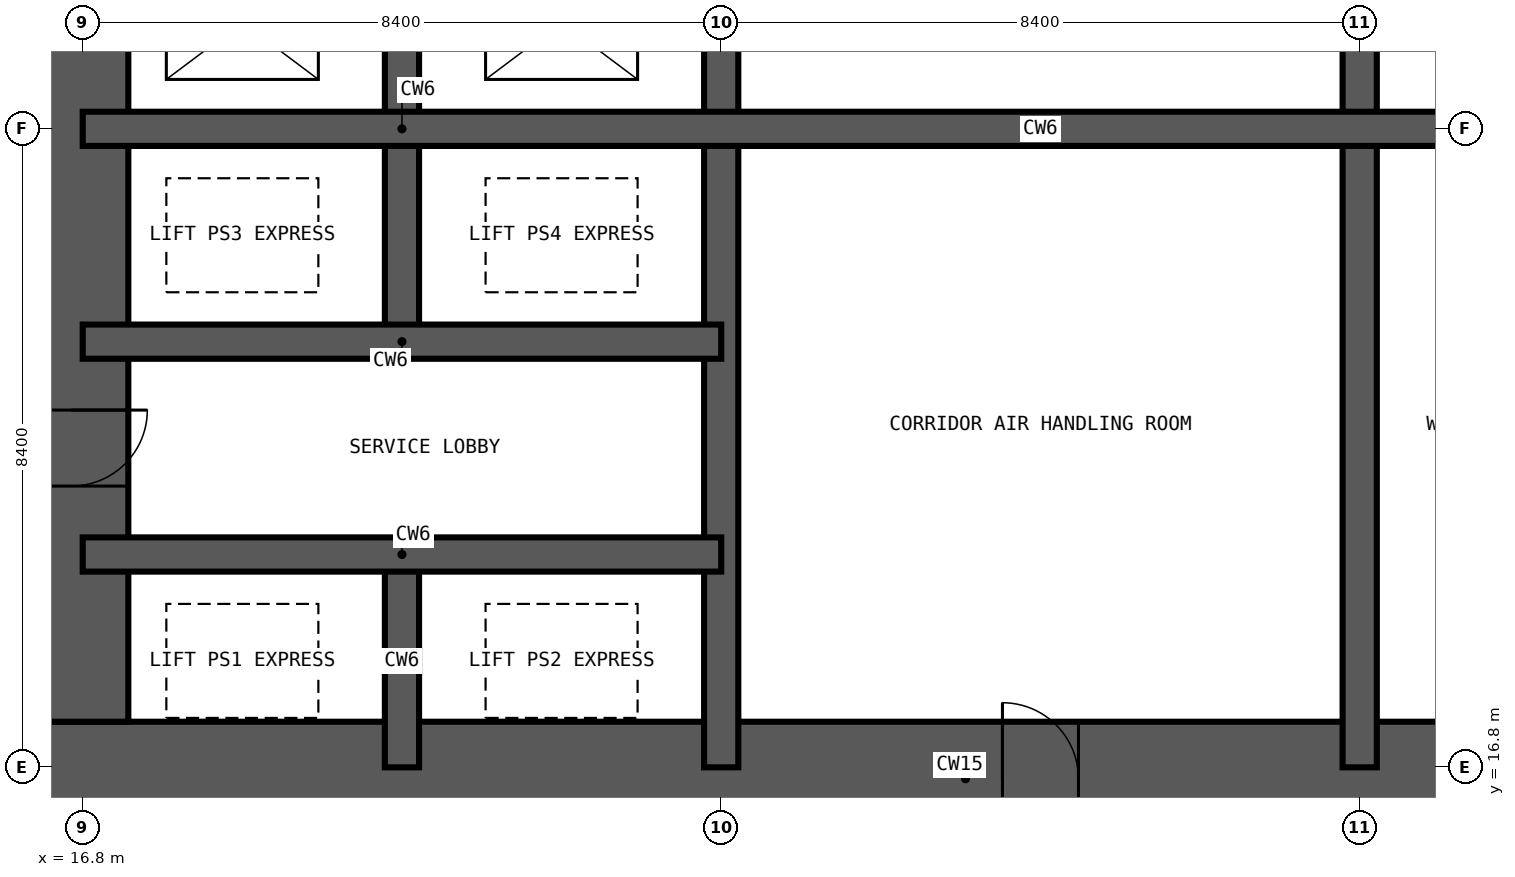
"""IFC4 building model, lengths in metres.
Left out: names, types, materials, properties, quantities, classifications, styles, units other than length and angle.
Written with IfcOpenShell. Run it as: python <this file> out.ifc"""

import sys

from ifc_helpers import new_model, si_unit, direction, frame, frame_2d, origin, place, context, subcontext, project, spatial, rectangle, extrude, element, fill, save


model = new_model("IFC4")
c1 = context("Model", 3, precision=1e-05, world=origin(), true_north=direction((0.0, 1.0)))
c2 = subcontext(c1, "Body", "Model", "MODEL_VIEW")
j1 = project(units=[si_unit("LENGTHUNIT", "METRE"), si_unit("PLANEANGLEUNIT", "RADIAN")], contexts=[c1])
p1 = place(None, origin())
s1 = spatial("IfcSite", under=j1, at=p1, CompositionType="ELEMENT")
p2 = place(p1, origin())
s2 = spatial("IfcBuilding", under=s1, at=p2, CompositionType="ELEMENT")
p3 = place(p2, frame((0.0, 0.0, 84.6)))
s3 = spatial("IfcBuildingStorey", under=s2, at=p3, CompositionType="ELEMENT", Elevation=84.6)
p4 = place(p3, frame((15.9, 16.65, -0.35), z_axis=(0.0, 0.0, 1.0), x_axis=(1.0, 0.0, 0.0)))
e1 = element("IfcWall", 1, at=p4, inside=s3, PredefinedType="SHEAR", context=c2, shape_type="SweptSolid", body=[
    extrude(rectangle(XDim=27.0, YDim=1.5, at=frame_2d((13.5, 0.0))), origin(), (0.0, 0.0, 1.0), 3.55),
])
p5 = place(p4, frame((13.0, 0.0, 0.35)))
e2 = element("IfcOpeningElement", 2, at=p5, cuts=e1, PredefinedType="OPENING", context=c2, shape_type="SweptSolid", body=[
    extrude(rectangle(XDim=1.0, YDim=2.1, at=frame_2d((0.5, 1.05))), frame((0.0, 0.76, 0.0), z_axis=(0.0, -1.0, 0.0), x_axis=(1.0, 0.0, 0.0)), (0.0, 0.0, 1.0), 1.52),
])
p6 = place(p4, frame((19.3, 0.0, 0.35)))
e3 = element("IfcOpeningElement", 3, at=p6, cuts=e1, PredefinedType="OPENING", context=c2, shape_type="SweptSolid", body=[
    extrude(rectangle(XDim=1.0, YDim=2.1, at=frame_2d((0.5, 1.05))), frame((0.0, 0.76, 0.0), z_axis=(0.0, -1.0, 0.0), x_axis=(1.0, 0.0, 0.0)), (0.0, 0.0, 1.0), 1.52),
])
p7 = place(p3, frame((16.65, 41.4, -0.35), z_axis=(0.0, 0.0, 1.0), x_axis=(0.0, -1.0, 0.0)))
e4 = element("IfcWall", 4, at=p7, inside=s3, PredefinedType="SHEAR", context=c2, shape_type="SweptSolid", body=[
    extrude(rectangle(XDim=24.0, YDim=1.5, at=frame_2d((12.0, 0.0))), origin(), (0.0, 0.0, 1.0), 3.55),
])
p8 = place(p7, frame((11.1, 0.0, 0.35)))
e5 = element("IfcOpeningElement", 5, at=p8, cuts=e4, PredefinedType="OPENING", context=c2, shape_type="SweptSolid", body=[
    extrude(rectangle(XDim=1.8, YDim=2.2, at=frame_2d((0.9, 1.1))), frame((0.0, 0.76, 0.0), z_axis=(0.0, -1.0, 0.0), x_axis=(1.0, 0.0, 0.0)), (0.0, 0.0, 1.0), 1.52),
])
p9 = place(p7, frame((19.9, 0.0, 0.35)))
e6 = element("IfcOpeningElement", 6, at=p9, cuts=e4, PredefinedType="OPENING", context=c2, shape_type="SweptSolid", body=[
    extrude(rectangle(XDim=1.0, YDim=2.1, at=frame_2d((0.5, 1.05))), frame((0.0, 0.76, 0.0), z_axis=(0.0, -1.0, 0.0), x_axis=(1.0, 0.0, 0.0)), (0.0, 0.0, 1.0), 1.52),
])
p10 = place(p7, frame((5.2, 0.0, 0.35)))
e7 = element("IfcOpeningElement", 7, at=p10, cuts=e4, PredefinedType="OPENING", context=c2, shape_type="SweptSolid", body=[
    extrude(rectangle(XDim=1.0, YDim=2.1, at=frame_2d((0.5, 1.05))), frame((0.0, 0.76, 0.0), z_axis=(0.0, -1.0, 0.0), x_axis=(1.0, 0.0, 0.0)), (0.0, 0.0, 1.0), 1.52),
])
p11 = place(p3, frame((21.0, 16.8, -0.35), z_axis=(0.0, 0.0, 1.0), x_axis=(0.0, 1.0, 0.0)))
e8 = element("IfcWall", 8, at=p11, inside=s3, PredefinedType="SHEAR", context=c2, shape_type="SweptSolid", body=[
    extrude(rectangle(XDim=2.8, YDim=0.45, at=frame_2d((1.4, 0.0))), origin(), (0.0, 0.0, 1.0), 3.55),
])
p12 = place(p3, frame((21.0, 22.4, -0.35), z_axis=(0.0, 0.0, 1.0), x_axis=(0.0, 1.0, 0.0)))
e9 = element("IfcWall", 9, at=p12, inside=s3, PredefinedType="SHEAR", context=c2, shape_type="SweptSolid", body=[
    extrude(rectangle(XDim=5.6, YDim=0.45, at=frame_2d((2.8, 0.0))), origin(), (0.0, 0.0, 1.0), 3.55),
])
p13 = place(p3, frame((25.2, 16.8, -0.35), z_axis=(0.0, 0.0, 1.0), x_axis=(0.0, 1.0, 0.0)))
e10 = element("IfcWall", 10, at=p13, inside=s3, PredefinedType="SHEAR", context=c2, shape_type="SweptSolid", body=[
    extrude(rectangle(XDim=25.2, YDim=0.45, at=frame_2d((12.6, 0.0))), origin(), (0.0, 0.0, 1.0), 3.55),
])
p14 = place(p3, frame((33.6, 16.8, -0.35), z_axis=(0.0, 0.0, 1.0), x_axis=(0.0, 1.0, 0.0)))
e11 = element("IfcWall", 11, at=p14, inside=s3, PredefinedType="SHEAR", context=c2, shape_type="SweptSolid", body=[
    extrude(rectangle(XDim=25.2, YDim=0.45, at=frame_2d((12.6, 0.0))), origin(), (0.0, 0.0, 1.0), 3.55),
])
p15 = place(p14, frame((22.5, 0.0, 0.35)))
e12 = element("IfcOpeningElement", 12, at=p15, cuts=e11, PredefinedType="OPENING", context=c2, shape_type="SweptSolid", body=[
    extrude(rectangle(XDim=1.2, YDim=2.2, at=frame_2d((0.6, 1.1))), frame((0.0, 0.235, 0.0), z_axis=(0.0, -1.0, 0.0), x_axis=(1.0, 0.0, 0.0)), (0.0, 0.0, 1.0), 0.47),
])
p16 = place(p14, frame((18.3, 0.0, 0.35)))
e13 = element("IfcOpeningElement", 13, at=p16, cuts=e11, PredefinedType="OPENING", context=c2, shape_type="SweptSolid", body=[
    extrude(rectangle(XDim=1.2, YDim=2.2, at=frame_2d((0.6, 1.1))), frame((0.0, 0.235, 0.0), z_axis=(0.0, -1.0, 0.0), x_axis=(1.0, 0.0, 0.0)), (0.0, 0.0, 1.0), 0.47),
])
p17 = place(p14, frame((12.1, 0.0, 0.35)))
e14 = element("IfcOpeningElement", 14, at=p17, cuts=e11, PredefinedType="OPENING", context=c2, shape_type="SweptSolid", body=[
    extrude(rectangle(XDim=1.0, YDim=2.1, at=frame_2d((0.5, 1.05))), frame((0.0, 0.235, 0.0), z_axis=(0.0, -1.0, 0.0), x_axis=(1.0, 0.0, 0.0)), (0.0, 0.0, 1.0), 0.47),
])
for number, where, z_axis, x_axis in (
    (15, (16.8, 19.6, -0.35), (0.0, 0.0, 1.0), (1.0, 0.0, 0.0)),
    (16, (16.8, 22.4, -0.35), (0.0, 0.0, 1.0), (1.0, 0.0, 0.0)),
):
    element("IfcWall", number, at=place(p3, frame(where, z_axis=z_axis, x_axis=x_axis)), inside=s3, PredefinedType="SHEAR", context=c2, shape_type="SweptSolid", body=[
        extrude(rectangle(XDim=8.4, YDim=0.45, at=frame_2d((4.2, 0.0))), origin(), (0.0, 0.0, 1.0), 3.55),
    ])
p18 = place(p3, frame((16.8, 25.2, -0.35), z_axis=(0.0, 0.0, 1.0), x_axis=(1.0, 0.0, 0.0)))
e17 = element("IfcWall", 17, at=p18, inside=s3, PredefinedType="SHEAR", context=c2, shape_type="SweptSolid", body=[
    extrude(rectangle(XDim=25.2, YDim=0.45, at=frame_2d((12.6, 0.0))), origin(), (0.0, 0.0, 1.0), 3.55),
])
p19 = place(p9, origin())
e18 = element("IfcDoor", 18, at=p19, inside=s3, OperationType="SINGLE_SWING_LEFT", PredefinedType="DOOR", context=c2, shape_type="SweptSolid", body=[
    extrude(rectangle(XDim=1.0, YDim=2.1, at=frame_2d((0.5, 1.05))), frame((0.0, 0.025, 0.0), z_axis=(0.0, -1.0, 0.0), x_axis=(1.0, 0.0, 0.0)), (0.0, 0.0, 1.0), 0.05),
])
fill(e6, e18)
p20 = place(p5, origin())
e19 = element("IfcDoor", 19, at=p20, inside=s3, OperationType="SINGLE_SWING_LEFT", PredefinedType="DOOR", context=c2, shape_type="SweptSolid", body=[
    extrude(rectangle(XDim=1.0, YDim=2.1, at=frame_2d((0.5, 1.05))), frame((0.0, 0.025, 0.0), z_axis=(0.0, -1.0, 0.0), x_axis=(1.0, 0.0, 0.0)), (0.0, 0.0, 1.0), 0.05),
])
fill(e2, e19)
save(model, sys.argv[1])
